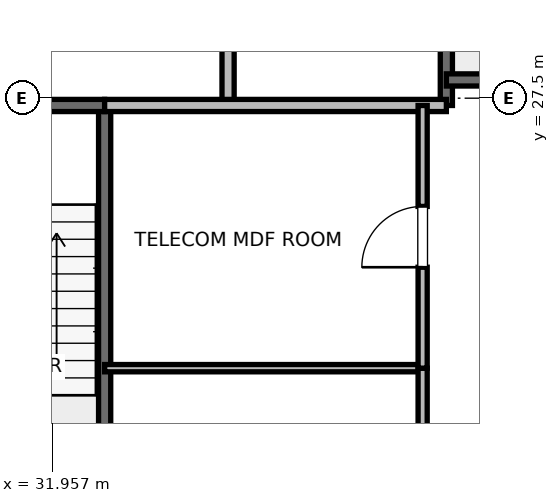
"""IFC4 building model, lengths in metres.
Left out: names, types, materials, properties, quantities, classifications, styles, units other than length and angle.
Written with IfcOpenShell. Run it as: python <this file> out.ifc"""

import sys

from ifc_helpers import new_model, si_unit, direction, frame, frame_2d, origin, place, context, subcontext, project, spatial, rectangle, extrude, element, fill, save


model = new_model("IFC4")
c1 = context("Model", 3, precision=1e-05, world=origin(), true_north=direction((0.0, 1.0)))
c2 = subcontext(c1, "Body", "Model", "MODEL_VIEW")
j1 = project(units=[si_unit("LENGTHUNIT", "METRE"), si_unit("PLANEANGLEUNIT", "RADIAN")], contexts=[c1])
p1 = place(None, origin())
s1 = spatial("IfcSite", under=j1, at=p1, CompositionType="ELEMENT")
p2 = place(p1, origin())
s2 = spatial("IfcBuilding", under=s1, at=p2, CompositionType="ELEMENT")
p3 = place(p2, frame((0.0, 0.0, 255.2)))
s3 = spatial("IfcBuildingStorey", under=s2, at=p3, CompositionType="ELEMENT", Elevation=255.2)
p4 = place(p3, frame((32.82, 18.6, 0.0), z_axis=(0.0, 0.0, 1.0), x_axis=(0.0, 1.0, 0.0)))
e1 = element("IfcWall", 1, at=p4, inside=s3, PredefinedType="SOLIDWALL", context=c2, shape_type="SweptSolid", body=[
    extrude(rectangle(XDim=8.78, YDim=0.2, at=frame_2d((4.39, 0.0))), origin(), (0.0, 0.0, 1.0), 3.785),
])
p5 = place(p3, frame((29.7, 27.38, 0.0), z_axis=(0.0, 0.0, 1.0), x_axis=(1.0, 0.0, 0.0)))
e2 = element("IfcWall", 2, at=p5, inside=s3, PredefinedType="SOLIDWALL", context=c2, shape_type="SweptSolid", body=[
    extrude(rectangle(XDim=3.12, YDim=0.2, at=frame_2d((1.56, 0.0))), origin(), (0.0, 0.0, 1.0), 3.785),
])
p6 = place(p5, frame((1.01, 0.0, 0.0)))
e3 = element("IfcOpeningElement", 3, at=p6, cuts=e2, PredefinedType="OPENING", context=c2, shape_type="SweptSolid", body=[
    extrude(rectangle(XDim=1.1, YDim=2.15, at=frame_2d((0.55, 1.075))), frame((0.0, 0.1, 0.0), z_axis=(0.0, -1.0, 0.0), x_axis=(1.0, 0.0, 0.0)), (0.0, 0.0, 1.0), 0.2),
])
p7 = place(p3, frame((38.44, 27.38, 0.0), z_axis=(0.0, 0.0, 1.0), x_axis=(0.0, 1.0, 0.0)))
e4 = element("IfcWall", 4, at=p7, inside=s3, PredefinedType="SOLIDWALL", context=c2, shape_type="SweptSolid", body=[
    extrude(rectangle(XDim=8.87, YDim=0.2, at=frame_2d((4.435, 0.0))), origin(), (0.0, 0.0, 1.0), 3.785),
])
p8 = place(p3, frame((38.44, 27.8, 0.0), z_axis=(0.0, 0.0, 1.0), x_axis=(1.0, 0.0, 0.0)))
e5 = element("IfcWall", 5, at=p8, inside=s3, PredefinedType="SOLIDWALL", context=c2, shape_type="SweptSolid", body=[
    extrude(rectangle(XDim=3.32, YDim=0.2, at=frame_2d((1.66, 0.0))), origin(), (0.0, 0.0, 1.0), 3.785),
])
p9 = place(p3, frame((34.85, 27.38, 0.0), z_axis=(0.0, 0.0, 1.0), x_axis=(0.0, 1.0, 0.0)))
e6 = element("IfcWall", 6, at=p9, inside=s3, PredefinedType="PARTITIONING", context=c2, shape_type="SweptSolid", body=[
    extrude(rectangle(XDim=3.37, YDim=0.2, at=frame_2d((1.685, 0.0))), origin(), (0.0, 0.0, 1.0), 3.785),
])
p10 = place(p9, frame((1.11, 0.0, 0.0)))
e7 = element("IfcOpeningElement", 7, at=p10, cuts=e6, PredefinedType="OPENING", context=c2, shape_type="SweptSolid", body=[
    extrude(rectangle(XDim=1.15, YDim=2.2, at=frame_2d((0.575, 1.1))), frame((0.0, 0.1, 0.0), z_axis=(0.0, -1.0, 0.0), x_axis=(1.0, 0.0, 0.0)), (0.0, 0.0, 1.0), 0.2),
])
p11 = place(p3, frame((32.82, 27.38, 0.0), z_axis=(0.0, 0.0, 1.0), x_axis=(1.0, 0.0, 0.0)))
e8 = element("IfcWall", 8, at=p11, inside=s3, PredefinedType="PARTITIONING", context=c2, shape_type="SweptSolid", body=[
    extrude(rectangle(XDim=5.62, YDim=0.2, at=frame_2d((2.81, 0.0))), origin(), (0.0, 0.0, 1.0), 3.785),
])
p12 = place(p3, frame((32.82, 23.06, 0.0), z_axis=(0.0, 0.0, 1.0), x_axis=(1.0, 0.0, 0.0)))
e9 = element("IfcWall", 9, at=p12, inside=s3, PredefinedType="PARTITIONING", context=c2, shape_type="SweptSolid", body=[
    extrude(rectangle(XDim=5.23, YDim=0.12, at=frame_2d((2.615, 0.0))), origin(), (0.0, 0.0, 1.0), 2.85),
])
p13 = place(p3, frame((38.05, 18.6, 0.0), z_axis=(0.0, 0.0, 1.0), x_axis=(0.0, 1.0, 0.0)))
e10 = element("IfcWall", 10, at=p13, inside=s3, PredefinedType="PARTITIONING", context=c2, shape_type="SweptSolid", body=[
    extrude(rectangle(XDim=4.46, YDim=0.15, at=frame_2d((2.23, 0.0))), origin(), (0.0, 0.0, 1.0), 2.85),
])
p14 = place(p13, frame((1.73, 0.0, 0.0)))
e11 = element("IfcOpeningElement", 11, at=p14, cuts=e10, PredefinedType="OPENING", context=c2, shape_type="SweptSolid", body=[
    extrude(rectangle(XDim=1.0, YDim=2.15, at=frame_2d((0.5, 1.075))), frame((0.0, 0.075, 0.0), z_axis=(0.0, -1.0, 0.0), x_axis=(1.0, 0.0, 0.0)), (0.0, 0.0, 1.0), 0.15),
])
p15 = place(p3, frame((38.05, 23.06, 0.0), z_axis=(0.0, 0.0, 1.0), x_axis=(0.0, 1.0, 0.0)))
e12 = element("IfcWall", 12, at=p15, inside=s3, PredefinedType="PARTITIONING", context=c2, shape_type="SweptSolid", body=[
    extrude(rectangle(XDim=4.32, YDim=0.15, at=frame_2d((2.16, 0.0))), origin(), (0.0, 0.0, 1.0), 2.85),
])
p16 = place(p15, frame((1.66, 0.0, 0.0)))
e13 = element("IfcOpeningElement", 13, at=p16, cuts=e12, PredefinedType="OPENING", context=c2, shape_type="SweptSolid", body=[
    extrude(rectangle(XDim=1.0, YDim=2.15, at=frame_2d((0.5, 1.075))), frame((0.0, 0.075, 0.0), z_axis=(0.0, -1.0, 0.0), x_axis=(1.0, 0.0, 0.0)), (0.0, 0.0, 1.0), 0.15),
])
p17 = place(p16, origin())
e14 = element("IfcDoor", 14, at=p17, inside=s3, OperationType="SINGLE_SWING_LEFT", PredefinedType="DOOR", context=c2, shape_type="SweptSolid", body=[
    extrude(rectangle(XDim=1.0, YDim=2.15, at=frame_2d((0.5, 1.075))), frame((0.0, 0.025, 0.0), z_axis=(0.0, -1.0, 0.0), x_axis=(1.0, 0.0, 0.0)), (0.0, 0.0, 1.0), 0.05),
])
fill(e13, e14)
save(model, sys.argv[1])
